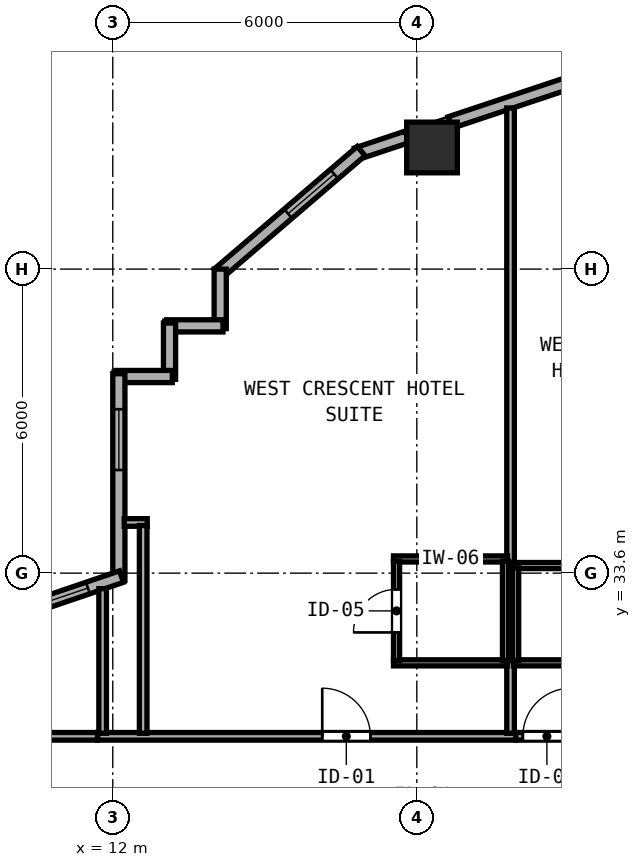
"""IFC4 building model, lengths in metres.
Left out: names, types, materials, properties, quantities, classifications, styles, units other than length and angle.
Written with IfcOpenShell. Run it as: python <this file> out.ifc"""

import sys

from ifc_helpers import new_model, si_unit, direction, frame, frame_2d, origin, origin_2d, place, context, subcontext, project, spatial, rectangle, hollow_rectangle, extrude, element, fill, save


model = new_model("IFC4")
c1 = context("Model", 3, precision=1e-05, world=origin(), true_north=direction((0.0, 1.0)))
c2 = subcontext(c1, "Body", "Model", "MODEL_VIEW")
j1 = project(units=[si_unit("LENGTHUNIT", "METRE"), si_unit("PLANEANGLEUNIT", "RADIAN")], contexts=[c1])
p1 = place(None, origin())
s1 = spatial("IfcSite", under=j1, at=p1, CompositionType="ELEMENT")
p2 = place(p1, origin())
s2 = spatial("IfcBuilding", under=s1, at=p2, CompositionType="ELEMENT")
p3 = place(p2, frame((0.0, 0.0, 35.4)))
s3 = spatial("IfcBuildingStorey", under=s2, at=p3, CompositionType="ELEMENT", Elevation=35.4)
p4 = place(p3, frame((18.3, 42.0, 0.0), z_axis=(0.0, 0.0, 1.0), x_axis=(1.0, 0.0, 0.0)))
e1 = element("IfcColumn", 1, at=p4, inside=s3, PredefinedType="COLUMN", context=c2, shape_type="SweptSolid", body=[
    extrude(hollow_rectangle(XDim=1.0, YDim=1.0, WallThickness=0.038, at=origin_2d()), origin(), (0.0, 0.0, 1.0), 3.8),
])
p5 = place(p3, frame((24.039, 44.287, 0.0), z_axis=(0.0, 0.0, 1.0), x_axis=(-0.948678995954, -0.316240672014, 0.0)))
e2 = element("IfcWall", 2, at=p5, inside=s3, PredefinedType="SOLIDWALL", context=c2, shape_type="SweptSolid", body=[
    extrude(rectangle(XDim=5.675, YDim=0.24, at=frame_2d((2.837, 0.0))), origin(), (0.0, 0.0, 1.0), 3.097),
])
p6 = place(p5, frame((0.7, 0.0, 0.85)))
e3 = element("IfcOpeningElement", 3, at=p6, cuts=e2, PredefinedType="OPENING", context=c2, shape_type="SweptSolid", body=[
    extrude(rectangle(XDim=1.2, YDim=1.85, at=frame_2d((0.6, 0.925))), frame((0.0, 0.13, 0.0), z_axis=(0.0, -1.0, 0.0), x_axis=(1.0, 0.0, 0.0)), (0.0, 0.0, 1.0), 0.26),
])
p7 = place(p3, frame((17.808, 42.209, 0.0), z_axis=(0.0, 0.0, 1.0), x_axis=(-0.948706457285, -0.316158279832, 0.0)))
e4 = element("IfcWall", 4, at=p7, inside=s3, PredefinedType="SOLIDWALL", context=c2, shape_type="SweptSolid", body=[
    extrude(rectangle(XDim=1.054, YDim=0.24, at=frame_2d((0.527, 0.0))), origin(), (0.0, 0.0, 1.0), 3.6),
])
p8 = place(p3, frame((16.902, 41.929, 0.0), z_axis=(0.0, 0.0, 1.0), x_axis=(-0.759275136126, -0.650769750112, 0.0)))
e5 = element("IfcWall", 5, at=p8, inside=s3, PredefinedType="SOLIDWALL", context=c2, shape_type="SweptSolid", body=[
    extrude(rectangle(XDim=3.719, YDim=0.24, at=frame_2d((1.86, 0.0))), origin(), (0.0, 0.0, 1.0), 3.6),
])
p9 = place(p8, frame((0.7, 0.0, 0.85)))
e6 = element("IfcOpeningElement", 6, at=p9, cuts=e5, PredefinedType="OPENING", context=c2, shape_type="SweptSolid", body=[
    extrude(rectangle(XDim=1.2, YDim=1.85, at=frame_2d((0.6, 0.925))), frame((0.0, 0.13, 0.0), z_axis=(0.0, -1.0, 0.0), x_axis=(1.0, 0.0, 0.0)), (0.0, 0.0, 1.0), 0.26),
])
p10 = place(p3, frame((14.12, 39.6, 0.0), z_axis=(0.0, 0.0, 1.0), x_axis=(0.0, -1.0, 0.0)))
e7 = element("IfcWall", 7, at=p10, inside=s3, PredefinedType="SOLIDWALL", context=c2, shape_type="SweptSolid", body=[
    extrude(rectangle(XDim=1.175, YDim=0.24, at=frame_2d((0.587, 0.0))), origin(), (0.0, 0.0, 1.0), 3.6),
])
p11 = place(p3, frame((14.175, 38.48, 0.0), z_axis=(0.0, 0.0, 1.0), x_axis=(-1.0, 0.0, 0.0)))
e8 = element("IfcWall", 8, at=p11, inside=s3, PredefinedType="SOLIDWALL", context=c2, shape_type="SweptSolid", body=[
    extrude(rectangle(XDim=1.11, YDim=0.24, at=frame_2d((0.555, 0.0))), origin(), (0.0, 0.0, 1.0), 3.6),
])
p12 = place(p3, frame((13.12, 38.535, 0.0), z_axis=(0.0, 0.0, 1.0), x_axis=(0.0, -1.0, 0.0)))
e9 = element("IfcWall", 9, at=p12, inside=s3, PredefinedType="SOLIDWALL", context=c2, shape_type="SweptSolid", body=[
    extrude(rectangle(XDim=1.11, YDim=0.24, at=frame_2d((0.555, 0.0))), origin(), (0.0, 0.0, 1.0), 3.6),
])
p13 = place(p3, frame((13.175, 37.48, 0.0), z_axis=(0.0, 0.0, 1.0), x_axis=(-1.0, 0.0, 0.0)))
e10 = element("IfcWall", 10, at=p13, inside=s3, PredefinedType="SOLIDWALL", context=c2, shape_type="SweptSolid", body=[
    extrude(rectangle(XDim=1.11, YDim=0.24, at=frame_2d((0.555, 0.0))), origin(), (0.0, 0.0, 1.0), 3.6),
])
p14 = place(p3, frame((12.12, 37.535, 0.0), z_axis=(0.0, 0.0, 1.0), x_axis=(0.0, -1.0, 0.0)))
e11 = element("IfcWall", 11, at=p14, inside=s3, PredefinedType="SOLIDWALL", context=c2, shape_type="SweptSolid", body=[
    extrude(rectangle(XDim=4.076, YDim=0.24, at=frame_2d((2.038, 0.0))), origin(), (0.0, 0.0, 1.0), 3.6),
])
p15 = place(p14, frame((0.7, 0.0, 0.85)))
e12 = element("IfcOpeningElement", 12, at=p15, cuts=e11, PredefinedType="OPENING", context=c2, shape_type="SweptSolid", body=[
    extrude(rectangle(XDim=1.2, YDim=1.85, at=frame_2d((0.6, 0.925))), frame((0.0, 0.13, 0.0), z_axis=(0.0, -1.0, 0.0), x_axis=(1.0, 0.0, 0.0)), (0.0, 0.0, 1.0), 0.26),
])
p16 = place(p3, frame((12.172, 33.532, 0.0), z_axis=(0.0, 0.0, 1.0), x_axis=(-0.946792852546, -0.321843586805, 0.0)))
e13 = element("IfcWall", 13, at=p16, inside=s3, PredefinedType="SOLIDWALL", context=c2, shape_type="SweptSolid", body=[
    extrude(rectangle(XDim=7.622, YDim=0.24, at=frame_2d((3.811, 0.0))), origin(), (0.0, 0.0, 1.0), 3.6),
])
p17 = place(p16, frame((0.7, 0.0, 0.85)))
e14 = element("IfcOpeningElement", 14, at=p17, cuts=e13, PredefinedType="OPENING", context=c2, shape_type="SweptSolid", body=[
    extrude(rectangle(XDim=1.2, YDim=1.85, at=frame_2d((0.6, 0.925))), frame((0.0, 0.13, 0.0), z_axis=(0.0, -1.0, 0.0), x_axis=(1.0, 0.0, 0.0)), (0.0, 0.0, 1.0), 0.26),
])
p18 = place(p3, frame((11.7, 30.38, 0.0), z_axis=(0.0, 0.0, 1.0), x_axis=(1.0, 0.0, 0.0)))
e15 = element("IfcWall", 15, at=p18, inside=s3, PredefinedType="PARTITIONING", context=c2, shape_type="SweptSolid", body=[
    extrude(rectangle(XDim=8.25, YDim=0.15, at=frame_2d((4.125, 0.0))), origin(), (0.0, 0.0, 1.0), 3.6),
])
p19 = place(p18, frame((4.434, 0.0, 0.0)))
e16 = element("IfcOpeningElement", 16, at=p19, cuts=e15, PredefinedType="OPENING", context=c2, shape_type="SweptSolid", body=[
    extrude(rectangle(XDim=0.95, YDim=2.18, at=frame_2d((0.475, 1.09))), frame((0.0, 0.085, 0.0), z_axis=(0.0, -1.0, 0.0), x_axis=(1.0, 0.0, 0.0)), (0.0, 0.0, 1.0), 0.17),
])
p20 = place(p3, frame((11.8, 30.44, 0.0), z_axis=(0.0, 0.0, 1.0), x_axis=(0.0, 1.0, 0.0)))
e17 = element("IfcWall", 17, at=p20, inside=s3, PredefinedType="PARTITIONING", context=c2, shape_type="SweptSolid", body=[
    extrude(rectangle(XDim=2.854, YDim=0.15, at=frame_2d((1.427, 0.0))), origin(), (0.0, 0.0, 1.0), 3.6),
])
p21 = place(p3, frame((19.85, 30.44, 0.0), z_axis=(0.0, 0.0, 1.0), x_axis=(0.0, 1.0, 0.0)))
e18 = element("IfcWall", 18, at=p21, inside=s3, PredefinedType="PARTITIONING", context=c2, shape_type="SweptSolid", body=[
    extrude(rectangle(XDim=12.34, YDim=0.15, at=frame_2d((6.17, 0.0))), origin(), (0.0, 0.0, 1.0), 3.6),
])
for number, where, z_axis, x_axis in (
    (19, (17.54, 33.88, 0.0), (0.0, 0.0, 1.0), (1.0, 0.0, 0.0)),
    (20, (17.54, 31.83, 0.0), (0.0, 0.0, 1.0), (1.0, 0.0, 0.0)),
):
    element("IfcWall", number, at=place(p3, frame(where, z_axis=z_axis, x_axis=x_axis)), inside=s3, PredefinedType="PARTITIONING", context=c2, shape_type="SweptSolid", body=[
        extrude(rectangle(XDim=2.25, YDim=0.12, at=frame_2d((1.125, 0.0))), origin(), (0.0, 0.0, 1.0), 3.6),
    ])
p22 = place(p3, frame((17.6, 31.875, 0.0), z_axis=(0.0, 0.0, 1.0), x_axis=(0.0, 1.0, 0.0)))
e21 = element("IfcWall", 21, at=p22, inside=s3, PredefinedType="PARTITIONING", context=c2, shape_type="SweptSolid", body=[
    extrude(rectangle(XDim=1.96, YDim=0.12, at=frame_2d((0.98, 0.0))), origin(), (0.0, 0.0, 1.0), 3.6),
])
p23 = place(p22, frame((1.405, 0.0, 0.0), z_axis=(0.0, 0.0, 1.0), x_axis=(-1.0, 0.0, 0.0)))
e22 = element("IfcOpeningElement", 22, at=p23, cuts=e21, PredefinedType="OPENING", context=c2, shape_type="SweptSolid", body=[
    extrude(rectangle(XDim=0.85, YDim=2.1, at=frame_2d((0.425, 1.05))), frame((0.0, 0.07, 0.0), z_axis=(0.0, -1.0, 0.0), x_axis=(1.0, 0.0, 0.0)), (0.0, 0.0, 1.0), 0.14),
])
p24 = place(p3, frame((19.75, 31.875, 0.0), z_axis=(0.0, 0.0, 1.0), x_axis=(0.0, 1.0, 0.0)))
e23 = element("IfcWall", 23, at=p24, inside=s3, PredefinedType="PARTITIONING", context=c2, shape_type="SweptSolid", body=[
    extrude(rectangle(XDim=1.96, YDim=0.12, at=frame_2d((0.98, 0.0))), origin(), (0.0, 0.0, 1.0), 3.6),
])
p25 = place(p3, frame((19.952, 30.38, 0.0), z_axis=(0.0, 0.0, 1.0), x_axis=(1.0, 0.0, 0.0)))
e24 = element("IfcWall", 24, at=p25, inside=s3, PredefinedType="PARTITIONING", context=c2, shape_type="SweptSolid", body=[
    extrude(rectangle(XDim=4.148, YDim=0.15, at=frame_2d((2.074, 0.0))), origin(), (0.0, 0.0, 1.0), 3.6),
])
p26 = place(p25, frame((0.14, 0.0, 0.0)))
e25 = element("IfcOpeningElement", 25, at=p26, cuts=e24, PredefinedType="OPENING", context=c2, shape_type="SweptSolid", body=[
    extrude(rectangle(XDim=0.95, YDim=2.15, at=frame_2d((0.475, 1.075))), frame((0.0, 0.085, 0.0), z_axis=(0.0, -1.0, 0.0), x_axis=(1.0, 0.0, 0.0)), (0.0, 0.0, 1.0), 0.17),
])
for number, where, z_axis, x_axis in (
    (26, (19.91, 33.75, 0.0), (0.0, 0.0, 1.0), (1.0, 0.0, 0.0)),
    (27, (19.91, 31.83, 0.0), (0.0, 0.0, 1.0), (1.0, 0.0, 0.0)),
):
    element("IfcWall", number, at=place(p3, frame(where, z_axis=z_axis, x_axis=x_axis)), inside=s3, PredefinedType="PARTITIONING", context=c2, shape_type="SweptSolid", body=[
        extrude(rectangle(XDim=2.08, YDim=0.12, at=frame_2d((1.04, 0.0))), origin(), (0.0, 0.0, 1.0), 3.6),
    ])
p27 = place(p3, frame((19.95, 31.875, 0.0), z_axis=(0.0, 0.0, 1.0), x_axis=(0.0, 1.0, 0.0)))
e28 = element("IfcWall", 28, at=p27, inside=s3, PredefinedType="PARTITIONING", context=c2, shape_type="SweptSolid", body=[
    extrude(rectangle(XDim=1.83, YDim=0.12, at=frame_2d((0.915, 0.0))), origin(), (0.0, 0.0, 1.0), 3.6),
])
p28 = place(p3, frame((12.225, 34.6, 0.0), z_axis=(0.0, 0.0, 1.0), x_axis=(1.0, 0.0, 0.0)))
e29 = element("IfcWall", 29, at=p28, inside=s3, PredefinedType="PARTITIONING", context=c2, shape_type="SweptSolid", body=[
    extrude(rectangle(XDim=0.455, YDim=0.15, at=frame_2d((0.228, 0.0))), origin(), (0.0, 0.0, 1.0), 3.6),
])
p29 = place(p3, frame((4.494, 30.38, 0.0), z_axis=(0.0, 0.0, 1.0), x_axis=(1.0, 0.0, 0.0)))
e30 = element("IfcWall", 30, at=p29, inside=s3, PredefinedType="PARTITIONING", context=c2, shape_type="SweptSolid", body=[
    extrude(rectangle(XDim=7.204, YDim=0.15, at=frame_2d((3.602, 0.0))), origin(), (0.0, 0.0, 1.0), 3.6),
])
p30 = place(p29, frame((4.144, 0.0, 0.0)))
e31 = element("IfcOpeningElement", 31, at=p30, cuts=e30, PredefinedType="OPENING", context=c2, shape_type="SweptSolid", body=[
    extrude(rectangle(XDim=0.95, YDim=2.12, at=frame_2d((0.475, 1.06))), frame((0.0, 0.085, 0.0), z_axis=(0.0, -1.0, 0.0), x_axis=(1.0, 0.0, 0.0)), (0.0, 0.0, 1.0), 0.17),
])
p31 = place(p3, frame((12.6, 30.44, 0.0), z_axis=(0.0, 0.0, 1.0), x_axis=(0.0, 1.0, 0.0)))
e32 = element("IfcWall", 32, at=p31, inside=s3, PredefinedType="PARTITIONING", context=c2, shape_type="SweptSolid", body=[
    extrude(rectangle(XDim=4.1, YDim=0.15, at=frame_2d((2.05, 0.0))), origin(), (0.0, 0.0, 1.0), 3.6),
])
p32 = place(p9, origin())
e33 = element("IfcWindow", 33, at=p32, inside=s3, PartitioningType="SINGLE_PANEL", PredefinedType="WINDOW", context=c2, shape_type="SweptSolid", body=[
    extrude(rectangle(XDim=1.2, YDim=1.85, at=frame_2d((0.6, 0.925))), frame((0.0, 0.03, 0.0), z_axis=(0.0, -1.0, 0.0), x_axis=(1.0, 0.0, 0.0)), (0.0, 0.0, 1.0), 0.06),
])
fill(e6, e33)
p33 = place(p15, origin())
e34 = element("IfcWindow", 34, at=p33, inside=s3, PartitioningType="SINGLE_PANEL", PredefinedType="WINDOW", context=c2, shape_type="SweptSolid", body=[
    extrude(rectangle(XDim=1.2, YDim=1.85, at=frame_2d((0.6, 0.925))), frame((0.0, 0.03, 0.0), z_axis=(0.0, -1.0, 0.0), x_axis=(1.0, 0.0, 0.0)), (0.0, 0.0, 1.0), 0.06),
])
fill(e12, e34)
p34 = place(p17, origin())
e35 = element("IfcWindow", 35, at=p34, inside=s3, PartitioningType="SINGLE_PANEL", PredefinedType="WINDOW", context=c2, shape_type="SweptSolid", body=[
    extrude(rectangle(XDim=1.2, YDim=1.85, at=frame_2d((0.6, 0.925))), frame((0.0, 0.03, 0.0), z_axis=(0.0, -1.0, 0.0), x_axis=(1.0, 0.0, 0.0)), (0.0, 0.0, 1.0), 0.06),
])
fill(e14, e35)
p35 = place(p19, origin())
e36 = element("IfcDoor", 36, at=p35, inside=s3, OperationType="SINGLE_SWING_LEFT", PredefinedType="DOOR", context=c2, shape_type="SweptSolid", body=[
    extrude(rectangle(XDim=0.95, YDim=2.18, at=frame_2d((0.475, 1.09))), frame((0.0, 0.025, 0.0), z_axis=(0.0, -1.0, 0.0), x_axis=(1.0, 0.0, 0.0)), (0.0, 0.0, 1.0), 0.05),
])
fill(e16, e36)
p36 = place(p23, origin())
e37 = element("IfcDoor", 37, at=p36, inside=s3, OperationType="SINGLE_SWING_RIGHT", PredefinedType="DOOR", context=c2, shape_type="SweptSolid", body=[
    extrude(rectangle(XDim=0.85, YDim=2.1, at=frame_2d((0.425, 1.05))), frame((0.0, 0.025, 0.0), z_axis=(0.0, -1.0, 0.0), x_axis=(1.0, 0.0, 0.0)), (0.0, 0.0, 1.0), 0.05),
])
fill(e22, e37)
p37 = place(p26, origin())
e38 = element("IfcDoor", 38, at=p37, inside=s3, OperationType="SINGLE_SWING_RIGHT", PredefinedType="DOOR", context=c2, shape_type="SweptSolid", body=[
    extrude(rectangle(XDim=0.95, YDim=2.15, at=frame_2d((0.475, 1.075))), frame((0.0, 0.025, 0.0), z_axis=(0.0, -1.0, 0.0), x_axis=(1.0, 0.0, 0.0)), (0.0, 0.0, 1.0), 0.05),
])
fill(e25, e38)
save(model, sys.argv[1])
